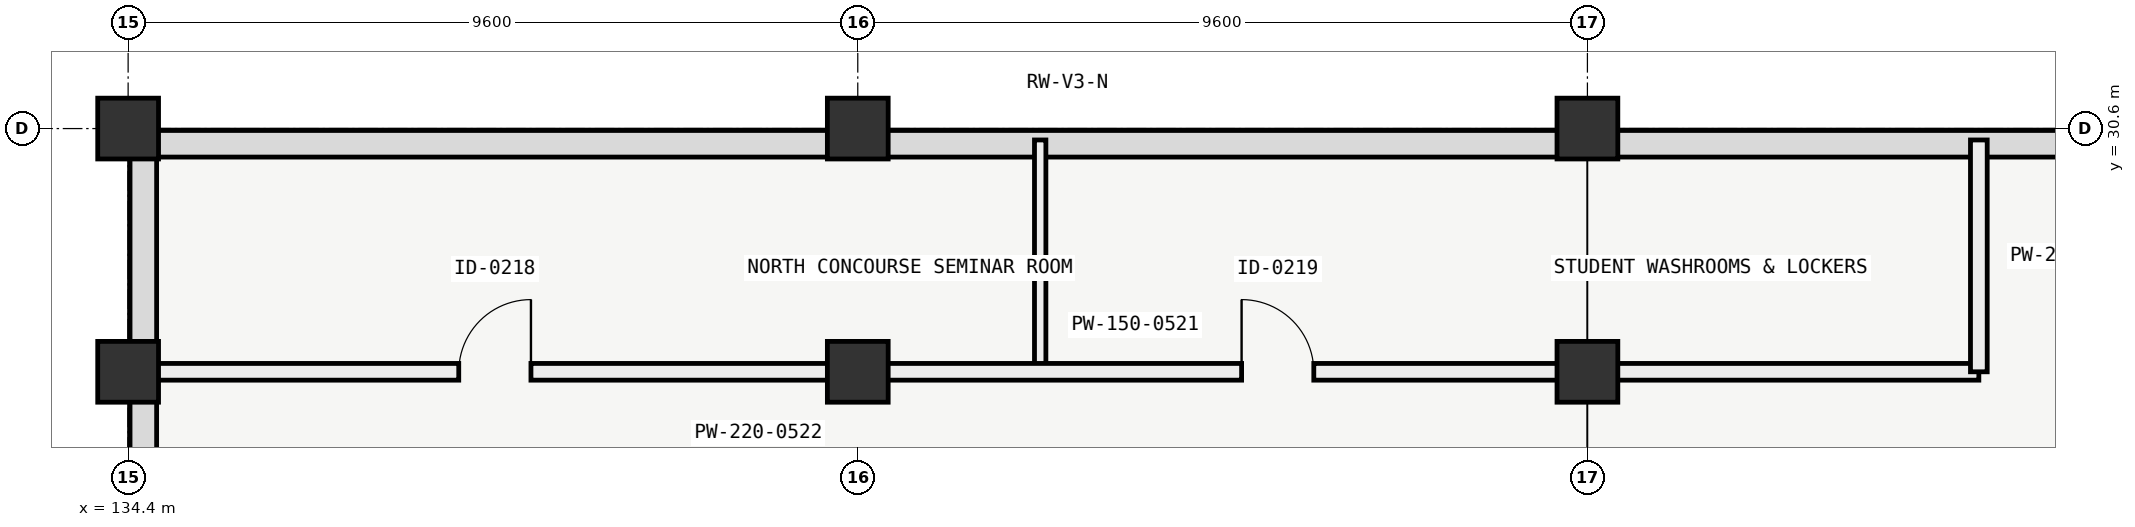
"""IFC4 building model, lengths in metres.
Left out: names, types, materials, properties, quantities, classifications, styles, units other than length and angle.
Written with IfcOpenShell. Run it as: python <this file> out.ifc"""

import sys

from ifc_helpers import new_model, si_unit, direction, frame, frame_2d, origin, origin_2d, place, context, subcontext, project, spatial, rectangle, extrude, element, fill, save


model = new_model("IFC4")
c1 = context("Model", 3, precision=1e-05, world=origin(), true_north=direction((0.0, 1.0)))
c2 = subcontext(c1, "Body", "Model", "MODEL_VIEW")
j1 = project(units=[si_unit("LENGTHUNIT", "METRE"), si_unit("PLANEANGLEUNIT", "RADIAN")], contexts=[c1])
p1 = place(None, origin())
s1 = spatial("IfcSite", under=j1, at=p1, CompositionType="ELEMENT")
p2 = place(p1, origin())
s2 = spatial("IfcBuilding", under=s1, at=p2, CompositionType="ELEMENT")
p3 = place(p2, frame((0.0, 0.0, -4.2)))
s3 = spatial("IfcBuildingStorey", under=s2, at=p3, CompositionType="ELEMENT", Elevation=-4.2)
for number, where, z_axis, x_axis in (
    (1, (134.4, 27.4, 0.0), (0.0, 0.0, 1.0), (1.0, 0.0, 0.0)),
    (2, (134.4, 30.6, 0.0), (0.0, 0.0, 1.0), (1.0, 0.0, 0.0)),
    (3, (144.0, 27.4, 0.0), (0.0, 0.0, 1.0), (1.0, 0.0, 0.0)),
    (4, (144.0, 30.6, 0.0), (0.0, 0.0, 1.0), (1.0, 0.0, 0.0)),
    (5, (153.6, 27.4, 0.0), (0.0, 0.0, 1.0), (1.0, 0.0, 0.0)),
    (6, (153.6, 30.6, 0.0), (0.0, 0.0, 1.0), (1.0, 0.0, 0.0)),
):
    element("IfcColumn", number, at=place(p3, frame(where, z_axis=z_axis, x_axis=x_axis)), inside=s3, PredefinedType="COLUMN", context=c2, shape_type="SweptSolid", body=[
        extrude(rectangle(XDim=0.8, YDim=0.8, at=origin_2d()), origin(), (0.0, 0.0, 1.0), 4.2),
    ])
p4 = place(p3, frame((134.6, 30.4, 0.0), z_axis=(0.0, 0.0, 1.0), x_axis=(1.0, 0.0, 0.0)))
e7 = element("IfcWall", 7, at=p4, inside=s3, PredefinedType="USERDEFINED", context=c2, shape_type="SweptSolid", body=[
    extrude(rectangle(XDim=38.0, YDim=0.35, at=frame_2d((19.0, 0.0))), origin(), (0.0, 0.0, 1.0), 3.9),
])
p5 = place(p3, frame((134.6, 0.2, 0.0), z_axis=(0.0, 0.0, 1.0), x_axis=(0.0, 1.0, 0.0)))
e8 = element("IfcWall", 8, at=p5, inside=s3, PredefinedType="USERDEFINED", context=c2, shape_type="SweptSolid", body=[
    extrude(rectangle(XDim=30.2, YDim=0.35, at=frame_2d((15.1, 0.0))), origin(), (0.0, 0.0, 1.0), 3.9),
])
p6 = place(p3, frame((146.4, 27.4, 0.0), z_axis=(0.0, 0.0, 1.0), x_axis=(0.0, 1.0, 0.0)))
e9 = element("IfcWall", 9, at=p6, inside=s3, PredefinedType="PARTITIONING", context=c2, shape_type="SweptSolid", body=[
    extrude(rectangle(XDim=3.05, YDim=0.15, at=frame_2d((1.525, 0.0))), origin(), (0.0, 0.0, 1.0), 3.85),
])
p7 = place(p3, frame((134.55, 27.4, 0.0), z_axis=(0.0, 0.0, 1.0), x_axis=(1.0, 0.0, 0.0)))
e10 = element("IfcWall", 10, at=p7, inside=s3, PredefinedType="PARTITIONING", context=c2, shape_type="SweptSolid", body=[
    extrude(rectangle(XDim=24.2, YDim=0.22, at=frame_2d((12.1, 0.0))), origin(), (0.0, 0.0, 1.0), 3.23),
])
p8 = place(p7, frame((4.2, 0.0, 0.0)))
e11 = element("IfcOpeningElement", 11, at=p8, cuts=e10, PredefinedType="OPENING", context=c2, shape_type="SweptSolid", body=[
    extrude(rectangle(XDim=0.95, YDim=2.1, at=frame_2d((0.475, 1.05))), frame((0.0, 0.12, 0.0), z_axis=(0.0, -1.0, 0.0), x_axis=(1.0, 0.0, 0.0)), (0.0, 0.0, 1.0), 0.24),
])
p9 = place(p7, frame((14.5, 0.0, 0.0)))
e12 = element("IfcOpeningElement", 12, at=p9, cuts=e10, PredefinedType="OPENING", context=c2, shape_type="SweptSolid", body=[
    extrude(rectangle(XDim=0.95, YDim=2.1, at=frame_2d((0.475, 1.05))), frame((0.0, 0.12, 0.0), z_axis=(0.0, -1.0, 0.0), x_axis=(1.0, 0.0, 0.0)), (0.0, 0.0, 1.0), 0.24),
])
p10 = place(p3, frame((158.75, 27.4, 0.0), z_axis=(0.0, 0.0, 1.0), x_axis=(0.0, 1.0, 0.0)))
e13 = element("IfcWall", 13, at=p10, inside=s3, PredefinedType="PARTITIONING", context=c2, shape_type="SweptSolid", body=[
    extrude(rectangle(XDim=3.05, YDim=0.22, at=frame_2d((1.525, 0.0))), origin(), (0.0, 0.0, 1.0), 3.23),
])
p11 = place(p8, origin())
e14 = element("IfcDoor", 14, at=p11, inside=s3, OperationType="SINGLE_SWING_RIGHT", PredefinedType="DOOR", context=c2, shape_type="SweptSolid", body=[
    extrude(rectangle(XDim=0.95, YDim=2.1, at=frame_2d((0.475, 1.05))), frame((0.0, 0.025, 0.0), z_axis=(0.0, -1.0, 0.0), x_axis=(1.0, 0.0, 0.0)), (0.0, 0.0, 1.0), 0.05),
])
fill(e11, e14)
p12 = place(p9, origin())
e15 = element("IfcDoor", 15, at=p12, inside=s3, OperationType="SINGLE_SWING_LEFT", PredefinedType="DOOR", context=c2, shape_type="SweptSolid", body=[
    extrude(rectangle(XDim=0.95, YDim=2.1, at=frame_2d((0.475, 1.05))), frame((0.0, 0.025, 0.0), z_axis=(0.0, -1.0, 0.0), x_axis=(1.0, 0.0, 0.0)), (0.0, 0.0, 1.0), 0.05),
])
fill(e12, e15)
save(model, sys.argv[1])
